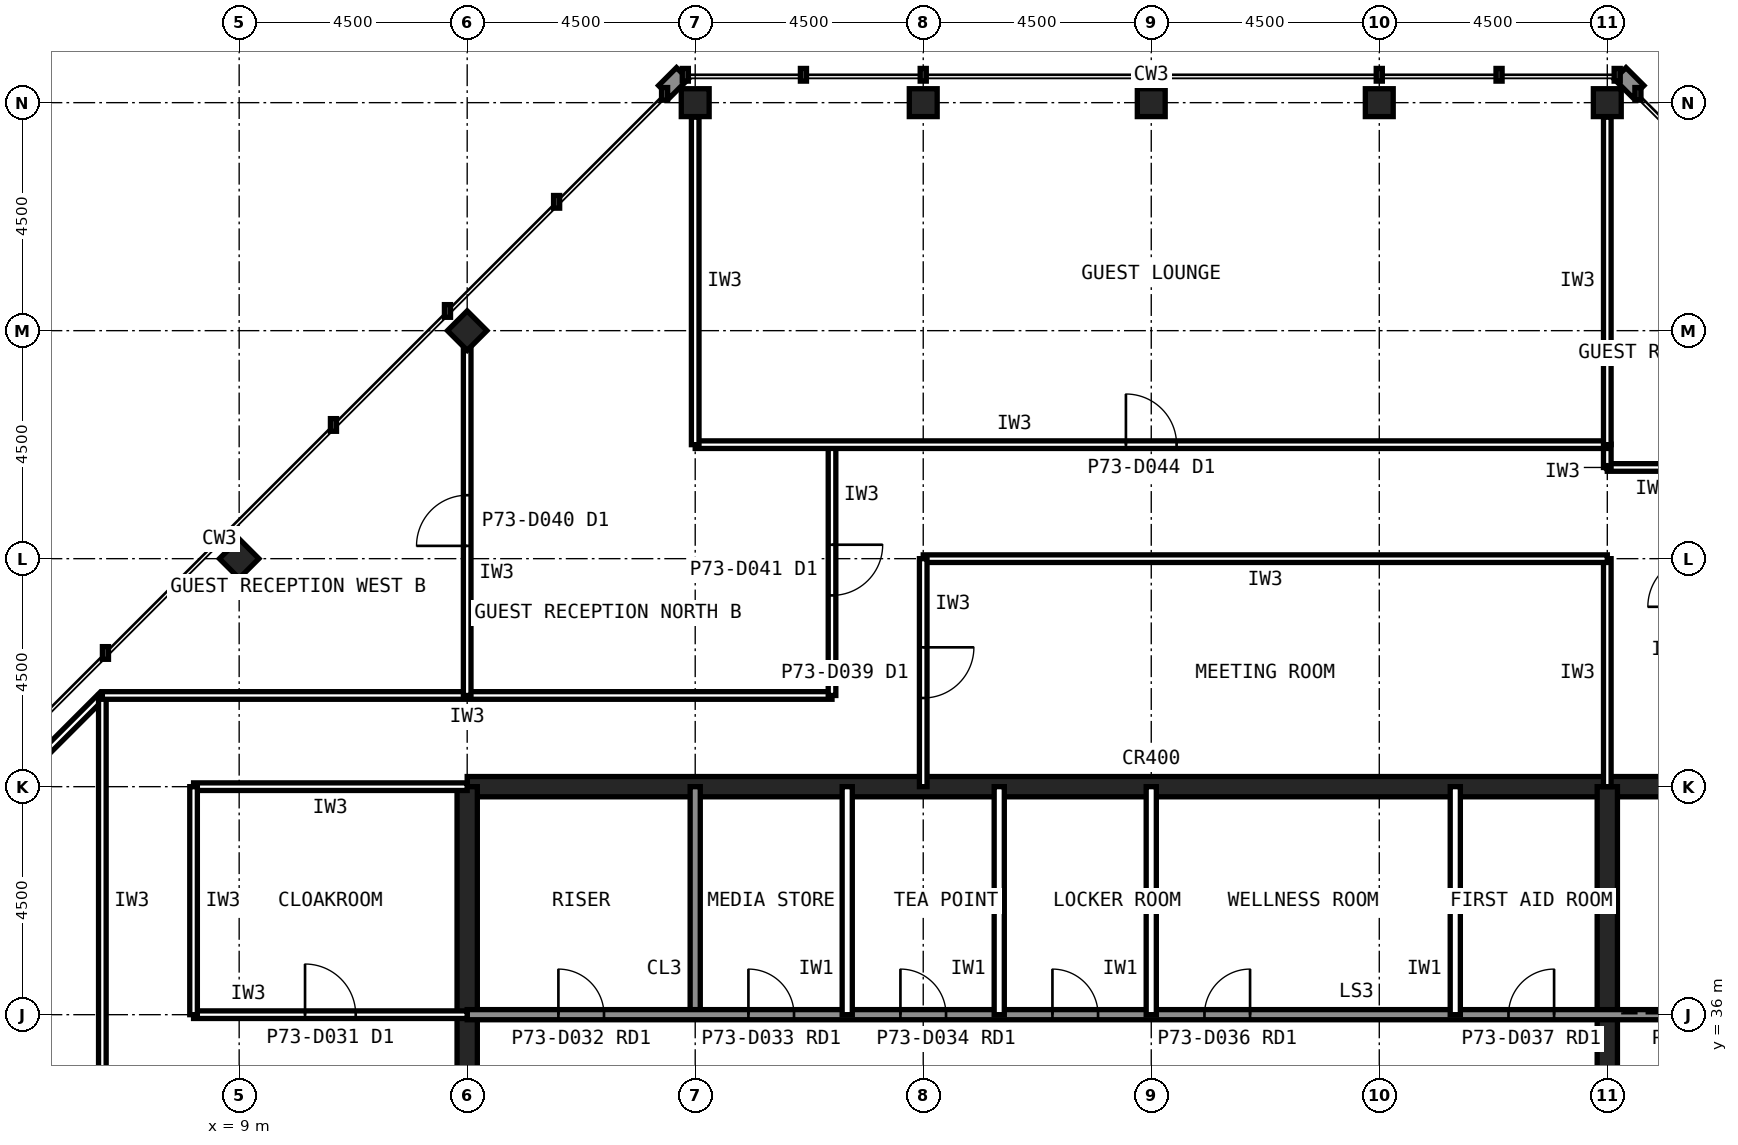
"""IFC4 building model, lengths in metres.
Left out: names, types, materials, properties, quantities, classifications, styles, units other than length and angle.
Written with IfcOpenShell. Run it as: python <this file> out.ifc"""

import sys

from ifc_helpers import new_model, si_unit, direction, frame, frame_2d, origin, origin_2d, place, context, subcontext, project, spatial, rectangle, hollow_rectangle, extrude, element, fill, save


model = new_model("IFC4")
c1 = context("Model", 3, precision=1e-05, world=origin(), true_north=direction((0.0, 1.0)))
c2 = subcontext(c1, "Body", "Model", "MODEL_VIEW")
j1 = project(units=[si_unit("LENGTHUNIT", "METRE"), si_unit("PLANEANGLEUNIT", "RADIAN")], contexts=[c1])
p1 = place(None, origin())
s1 = spatial("IfcSite", under=j1, at=p1, CompositionType="ELEMENT")
p2 = place(p1, origin())
s2 = spatial("IfcBuilding", under=s1, at=p2, CompositionType="ELEMENT")
p3 = place(p2, frame((0.0, 0.0, 302.6)))
s3 = spatial("IfcBuildingStorey", under=s2, at=p3, CompositionType="ELEMENT", Elevation=302.6)
for number, where, z_axis, x_axis in (
    (1, (36.0, 54.0, 0.0), (0.0, 0.0, 1.0), (1.0, 0.0, 0.0)),
    (2, (31.5, 54.0, 0.0), (0.0, 0.0, 1.0), (1.0, 0.0, 0.0)),
    (3, (27.0, 54.0, 0.0), (0.0, 0.0, 1.0), (1.0, 0.0, 0.0)),
    (4, (22.5, 54.0, 0.0), (0.0, 0.0, 1.0), (1.0, 0.0, 0.0)),
    (5, (18.0, 54.0, 0.0), (0.0, 0.0, 1.0), (1.0, 0.0, 0.0)),
    (6, (9.0, 45.0, 0.0), (0.0, 0.0, 1.0), (0.707, 0.707, 0.0)),
    (7, (13.5, 49.5, 0.0), (0.0, 0.0, 1.0), (0.707, 0.707, 0.0)),
):
    element("IfcColumn", number, at=place(p3, frame(where, z_axis=z_axis, x_axis=x_axis)), inside=s3, PredefinedType="COLUMN", context=c2, shape_type="SweptSolid", body=[
        extrude(hollow_rectangle(XDim=0.55, YDim=0.55, WallThickness=0.025, at=origin_2d()), origin(), (0.0, 0.0, 1.0), 4.0),
    ])
p4 = place(p3, frame((40.5, 40.5, 0.0), z_axis=(0.0, 0.0, 1.0), x_axis=(-1.0, 0.0, 0.0)))
e8 = element("IfcWall", 8, at=p4, inside=s3, PredefinedType="SHEAR", context=c2, shape_type="SweptSolid", body=[
    extrude(rectangle(XDim=27.0, YDim=0.4, at=frame_2d((13.5, 0.0))), origin(), (0.0, 0.0, 1.0), 4.0),
])
p5 = place(p3, frame((13.5, 40.5, 0.0), z_axis=(0.0, 0.0, 1.0), x_axis=(0.0, -1.0, 0.0)))
e9 = element("IfcWall", 9, at=p5, inside=s3, PredefinedType="SHEAR", context=c2, shape_type="SweptSolid", body=[
    extrude(rectangle(XDim=27.0, YDim=0.4, at=frame_2d((13.5, 0.0))), origin(), (0.0, 0.0, 1.0), 4.0),
])
p6 = place(p5, frame((19.65, 0.0, 0.0)))
e10 = element("IfcOpeningElement", 10, at=p6, cuts=e9, PredefinedType="OPENING", context=c2, shape_type="SweptSolid", body=[
    extrude(rectangle(XDim=1.2, YDim=2.1, at=frame_2d((0.6, 1.05))), frame((0.0, 0.21, 0.0), z_axis=(0.0, -1.0, 0.0), x_axis=(1.0, 0.0, 0.0)), (0.0, 0.0, 1.0), 0.42),
])
p7 = place(p5, frame((5.85, 0.0, 0.0)))
e11 = element("IfcOpeningElement", 11, at=p7, cuts=e9, PredefinedType="OPENING", context=c2, shape_type="SweptSolid", body=[
    extrude(rectangle(XDim=1.8, YDim=2.1, at=frame_2d((0.9, 1.05))), frame((0.0, 0.21, 0.0), z_axis=(0.0, -1.0, 0.0), x_axis=(1.0, 0.0, 0.0)), (0.0, 0.0, 1.0), 0.42),
])
p8 = place(p3, frame((18.0, 36.0, 0.0), z_axis=(0.0, 0.0, 1.0), x_axis=(0.0, 1.0, 0.0)))
e12 = element("IfcWall", 12, at=p8, inside=s3, PredefinedType="SOLIDWALL", context=c2, shape_type="SweptSolid", body=[
    extrude(rectangle(XDim=4.5, YDim=0.2, at=frame_2d((2.25, 0.0))), origin(), (0.0, 0.0, 1.0), 3.84),
])
p9 = place(p3, frame((36.0, 22.5, 0.0), z_axis=(0.0, 0.0, 1.0), x_axis=(0.0, 1.0, 0.0)))
e13 = element("IfcWall", 13, at=p9, inside=s3, PredefinedType="SHEAR", context=c2, shape_type="SweptSolid", body=[
    extrude(rectangle(XDim=18.0, YDim=0.4, at=frame_2d((9.0, 0.0))), origin(), (0.0, 0.0, 1.0), 4.0),
])
p10 = place(p3, frame((13.5, 36.0, 0.0), z_axis=(0.0, 0.0, 1.0), x_axis=(1.0, 0.0, 0.0)))
e14 = element("IfcWall", 14, at=p10, inside=s3, PredefinedType="SOLIDWALL", context=c2, shape_type="SweptSolid", body=[
    extrude(rectangle(XDim=27.0, YDim=0.2, at=frame_2d((13.5, 0.0))), origin(), (0.0, 0.0, 1.0), 3.84),
])
p11 = place(p10, frame((1.8, 0.0, 0.0)))
e15 = element("IfcOpeningElement", 15, at=p11, cuts=e14, PredefinedType="OPENING", context=c2, shape_type="SweptSolid", body=[
    extrude(rectangle(XDim=0.9, YDim=2.1, at=frame_2d((0.45, 1.05))), frame((0.0, 0.11, 0.0), z_axis=(0.0, -1.0, 0.0), x_axis=(1.0, 0.0, 0.0)), (0.0, 0.0, 1.0), 0.22),
])
p12 = place(p10, frame((5.55, 0.0, 0.0)))
e16 = element("IfcOpeningElement", 16, at=p12, cuts=e14, PredefinedType="OPENING", context=c2, shape_type="SweptSolid", body=[
    extrude(rectangle(XDim=0.9, YDim=2.1, at=frame_2d((0.45, 1.05))), frame((0.0, 0.11, 0.0), z_axis=(0.0, -1.0, 0.0), x_axis=(1.0, 0.0, 0.0)), (0.0, 0.0, 1.0), 0.22),
])
p13 = place(p10, frame((14.55, 0.0, 0.0)))
e17 = element("IfcOpeningElement", 17, at=p13, cuts=e14, PredefinedType="OPENING", context=c2, shape_type="SweptSolid", body=[
    extrude(rectangle(XDim=0.9, YDim=2.1, at=frame_2d((0.45, 1.05))), frame((0.0, 0.11, 0.0), z_axis=(0.0, -1.0, 0.0), x_axis=(1.0, 0.0, 0.0)), (0.0, 0.0, 1.0), 0.22),
])
p14 = place(p10, frame((17.55, 0.0, 0.0)))
e18 = element("IfcOpeningElement", 18, at=p14, cuts=e14, PredefinedType="OPENING", context=c2, shape_type="SweptSolid", body=[
    extrude(rectangle(XDim=0.9, YDim=2.1, at=frame_2d((0.45, 1.05))), frame((0.0, 0.11, 0.0), z_axis=(0.0, -1.0, 0.0), x_axis=(1.0, 0.0, 0.0)), (0.0, 0.0, 1.0), 0.22),
])
p15 = place(p10, frame((20.55, 0.0, 0.0)))
e19 = element("IfcOpeningElement", 19, at=p15, cuts=e14, PredefinedType="OPENING", context=c2, shape_type="SweptSolid", body=[
    extrude(rectangle(XDim=0.9, YDim=2.1, at=frame_2d((0.45, 1.05))), frame((0.0, 0.11, 0.0), z_axis=(0.0, -1.0, 0.0), x_axis=(1.0, 0.0, 0.0)), (0.0, 0.0, 1.0), 0.22),
])
p16 = place(p10, frame((24.1, 0.0, 0.0)))
e20 = element("IfcOpeningElement", 20, at=p16, cuts=e14, PredefinedType="OPENING", context=c2, shape_type="SweptSolid", body=[
    extrude(rectangle(XDim=1.3, YDim=2.2, at=frame_2d((0.65, 1.1))), frame((0.0, 0.11, 0.0), z_axis=(0.0, -1.0, 0.0), x_axis=(1.0, 0.0, 0.0)), (0.0, 0.0, 1.0), 0.22),
])
for number, where, z_axis, x_axis in (
    (21, (27.0, 36.0, 0.0), (0.0, 0.0, 1.0), (0.0, 1.0, 0.0)),
    (22, (30.0, 36.0, 0.0), (0.0, 0.0, 1.0), (0.0, 1.0, 0.0)),
    (23, (33.0, 36.0, 0.0), (0.0, 0.0, 1.0), (0.0, 1.0, 0.0)),
):
    element("IfcWall", number, at=place(p3, frame(where, z_axis=z_axis, x_axis=x_axis)), inside=s3, PredefinedType="PARTITIONING", context=c2, shape_type="SweptSolid", body=[
        extrude(rectangle(XDim=4.5, YDim=0.2, at=frame_2d((2.25, 0.0))), origin(), (0.0, 0.0, 1.0), 3.84),
    ])
p17 = place(p3, frame((0.201, 36.201, 0.0), z_axis=(0.0, 0.0, 1.0), x_axis=(0.707106781187, 0.707106781187, 0.0)))
e24 = element("IfcWall", 24, at=p17, inside=s3, PredefinedType="PARTITIONING", context=c2, shape_type="SweptSolid", body=[
    extrude(rectangle(XDim=8.625, YDim=0.15, at=frame_2d((4.312, 0.0))), origin(), (0.0, 0.0, 1.0), 3.223),
])
p18 = place(p3, frame((6.3, 42.3, 0.0), z_axis=(0.0, 0.0, 1.0), x_axis=(0.0, -1.0, 0.0)))
e25 = element("IfcWall", 25, at=p18, inside=s3, PredefinedType="PARTITIONING", context=c2, shape_type="SweptSolid", body=[
    extrude(rectangle(XDim=8.1, YDim=0.15, at=frame_2d((4.05, 0.0))), origin(), (0.0, 0.0, 1.0), 3.84),
])
p19 = place(p3, frame((37.8, 46.8, 0.0), z_axis=(0.0, 0.0, 1.0), x_axis=(-1.0, 0.0, 0.0)))
e26 = element("IfcWall", 26, at=p19, inside=s3, PredefinedType="PARTITIONING", context=c2, shape_type="SweptSolid", body=[
    extrude(rectangle(XDim=1.8, YDim=0.15, at=frame_2d((0.9, 0.0))), origin(), (0.0, 0.0, 1.0), 3.84),
])
p20 = place(p3, frame((36.0, 46.8, 0.0), z_axis=(0.0, 0.0, 1.0), x_axis=(0.0, 1.0, 0.0)))
e27 = element("IfcWall", 27, at=p20, inside=s3, PredefinedType="PARTITIONING", context=c2, shape_type="SweptSolid", body=[
    extrude(rectangle(XDim=0.46, YDim=0.15, at=frame_2d((0.23, 0.0))), origin(), (0.0, 0.0, 1.0), 2.989),
])
p21 = place(p3, frame((20.7, 42.3, 0.0), z_axis=(0.0, 0.0, 1.0), x_axis=(-1.0, 0.0, 0.0)))
e28 = element("IfcWall", 28, at=p21, inside=s3, PredefinedType="PARTITIONING", context=c2, shape_type="SweptSolid", body=[
    extrude(rectangle(XDim=14.4, YDim=0.15, at=frame_2d((7.2, 0.0))), origin(), (0.0, 0.0, 1.0), 3.84),
])
p22 = place(p3, frame((20.7, 47.25, 0.0), z_axis=(0.0, 0.0, 1.0), x_axis=(0.0, -1.0, 0.0)))
e29 = element("IfcWall", 29, at=p22, inside=s3, PredefinedType="PARTITIONING", context=c2, shape_type="SweptSolid", body=[
    extrude(rectangle(XDim=4.95, YDim=0.15, at=frame_2d((2.475, 0.0))), origin(), (0.0, 0.0, 1.0), 3.84),
])
p23 = place(p22, frame((1.975, 0.0, 0.0)))
e30 = element("IfcOpeningElement", 30, at=p23, cuts=e29, PredefinedType="OPENING", context=c2, shape_type="SweptSolid", body=[
    extrude(rectangle(XDim=1.0, YDim=2.1, at=frame_2d((0.5, 1.05))), frame((0.0, 0.085, 0.0), z_axis=(0.0, -1.0, 0.0), x_axis=(1.0, 0.0, 0.0)), (0.0, 0.0, 1.0), 0.17),
])
p24 = place(p3, frame((18.0, 47.25, 0.0), z_axis=(0.0, 0.0, 1.0), x_axis=(1.0, 0.0, 0.0)))
e31 = element("IfcWall", 31, at=p24, inside=s3, PredefinedType="PARTITIONING", context=c2, shape_type="SweptSolid", body=[
    extrude(rectangle(XDim=18.0, YDim=0.15, at=frame_2d((9.0, 0.0))), origin(), (0.0, 0.0, 1.0), 3.84),
])
p25 = place(p24, frame((8.5, 0.0, 0.0)))
e32 = element("IfcOpeningElement", 32, at=p25, cuts=e31, PredefinedType="OPENING", context=c2, shape_type="SweptSolid", body=[
    extrude(rectangle(XDim=1.0, YDim=2.1, at=frame_2d((0.5, 1.05))), frame((0.0, 0.085, 0.0), z_axis=(0.0, -1.0, 0.0), x_axis=(1.0, 0.0, 0.0)), (0.0, 0.0, 1.0), 0.17),
])
for number, where, z_axis, x_axis in (
    (33, (36.0, 47.25, 0.0), (0.0, 0.0, 1.0), (0.0, 1.0, 0.0)),
    (34, (18.0, 53.715, 0.0), (0.0, 0.0, 1.0), (0.0, -1.0, 0.0)),
):
    element("IfcWall", number, at=place(p3, frame(where, z_axis=z_axis, x_axis=x_axis)), inside=s3, PredefinedType="PARTITIONING", context=c2, shape_type="SweptSolid", body=[
        extrude(rectangle(XDim=6.465, YDim=0.15, at=frame_2d((3.232, 0.0))), origin(), (0.0, 0.0, 1.0), 2.989),
    ])
p26 = place(p3, frame((36.0, 40.5, 0.0), z_axis=(0.0, 0.0, 1.0), x_axis=(0.0, 1.0, 0.0)))
e35 = element("IfcWall", 35, at=p26, inside=s3, PredefinedType="PARTITIONING", context=c2, shape_type="SweptSolid", body=[
    extrude(rectangle(XDim=4.5, YDim=0.15, at=frame_2d((2.25, 0.0))), origin(), (0.0, 0.0, 1.0), 2.989),
])
p27 = place(p3, frame((36.0, 45.0, 0.0), z_axis=(0.0, 0.0, 1.0), x_axis=(-1.0, 0.0, 0.0)))
e36 = element("IfcWall", 36, at=p27, inside=s3, PredefinedType="PARTITIONING", context=c2, shape_type="SweptSolid", body=[
    extrude(rectangle(XDim=13.5, YDim=0.15, at=frame_2d((6.75, 0.0))), origin(), (0.0, 0.0, 1.0), 3.84),
])
p28 = place(p3, frame((22.5, 45.0, 0.0), z_axis=(0.0, 0.0, 1.0), x_axis=(0.0, -1.0, 0.0)))
e37 = element("IfcWall", 37, at=p28, inside=s3, PredefinedType="PARTITIONING", context=c2, shape_type="SweptSolid", body=[
    extrude(rectangle(XDim=4.5, YDim=0.15, at=frame_2d((2.25, 0.0))), origin(), (0.0, 0.0, 1.0), 2.989),
])
p29 = place(p28, frame((1.75, 0.0, 0.0)))
e38 = element("IfcOpeningElement", 38, at=p29, cuts=e37, PredefinedType="OPENING", context=c2, shape_type="SweptSolid", body=[
    extrude(rectangle(XDim=1.0, YDim=2.1, at=frame_2d((0.5, 1.05))), frame((0.0, 0.085, 0.0), z_axis=(0.0, -1.0, 0.0), x_axis=(1.0, 0.0, 0.0)), (0.0, 0.0, 1.0), 0.17),
])
p30 = place(p3, frame((8.1, 36.0, 0.0), z_axis=(0.0, 0.0, 1.0), x_axis=(1.0, 0.0, 0.0)))
e39 = element("IfcWall", 39, at=p30, inside=s3, PredefinedType="PARTITIONING", context=c2, shape_type="SweptSolid", body=[
    extrude(rectangle(XDim=5.4, YDim=0.15, at=frame_2d((2.7, 0.0))), origin(), (0.0, 0.0, 1.0), 2.989),
])
p31 = place(p30, frame((2.2, 0.0, 0.0)))
e40 = element("IfcOpeningElement", 40, at=p31, cuts=e39, PredefinedType="OPENING", context=c2, shape_type="SweptSolid", body=[
    extrude(rectangle(XDim=1.0, YDim=2.1, at=frame_2d((0.5, 1.05))), frame((0.0, 0.085, 0.0), z_axis=(0.0, -1.0, 0.0), x_axis=(1.0, 0.0, 0.0)), (0.0, 0.0, 1.0), 0.17),
])
p32 = place(p3, frame((13.5, 40.5, 0.0), z_axis=(0.0, 0.0, 1.0), x_axis=(-1.0, 0.0, 0.0)))
e41 = element("IfcWall", 41, at=p32, inside=s3, PredefinedType="PARTITIONING", context=c2, shape_type="SweptSolid", body=[
    extrude(rectangle(XDim=5.4, YDim=0.15, at=frame_2d((2.7, 0.0))), origin(), (0.0, 0.0, 1.0), 2.989),
])
p33 = place(p3, frame((8.1, 40.5, 0.0), z_axis=(0.0, 0.0, 1.0), x_axis=(0.0, -1.0, 0.0)))
e42 = element("IfcWall", 42, at=p33, inside=s3, PredefinedType="PARTITIONING", context=c2, shape_type="SweptSolid", body=[
    extrude(rectangle(XDim=4.5, YDim=0.15, at=frame_2d((2.25, 0.0))), origin(), (0.0, 0.0, 1.0), 3.84),
])
p34 = place(p3, frame((13.5, 42.3, 0.0), z_axis=(0.0, 0.0, 1.0), x_axis=(0.0, 1.0, 0.0)))
e43 = element("IfcWall", 43, at=p34, inside=s3, PredefinedType="PARTITIONING", context=c2, shape_type="SweptSolid", body=[
    extrude(rectangle(XDim=6.905, YDim=0.15, at=frame_2d((3.453, 0.0))), origin(), (0.0, 0.0, 1.0), 2.989),
])
p35 = place(p34, frame((2.952, 0.0, 0.0)))
e44 = element("IfcOpeningElement", 44, at=p35, cuts=e43, PredefinedType="OPENING", context=c2, shape_type="SweptSolid", body=[
    extrude(rectangle(XDim=1.0, YDim=2.1, at=frame_2d((0.5, 1.05))), frame((0.0, 0.085, 0.0), z_axis=(0.0, -1.0, 0.0), x_axis=(1.0, 0.0, 0.0)), (0.0, 0.0, 1.0), 0.17),
])
p36 = place(p11, origin())
e45 = element("IfcDoor", 45, at=p36, inside=s3, OperationType="SINGLE_SWING_LEFT", PredefinedType="DOOR", context=c2, shape_type="SweptSolid", body=[
    extrude(rectangle(XDim=0.9, YDim=2.1, at=frame_2d((0.45, 1.05))), frame((0.0, 0.025, 0.0), z_axis=(0.0, -1.0, 0.0), x_axis=(1.0, 0.0, 0.0)), (0.0, 0.0, 1.0), 0.05),
])
fill(e15, e45)
p37 = place(p12, origin())
e46 = element("IfcDoor", 46, at=p37, inside=s3, OperationType="SINGLE_SWING_LEFT", PredefinedType="DOOR", context=c2, shape_type="SweptSolid", body=[
    extrude(rectangle(XDim=0.9, YDim=2.1, at=frame_2d((0.45, 1.05))), frame((0.0, 0.025, 0.0), z_axis=(0.0, -1.0, 0.0), x_axis=(1.0, 0.0, 0.0)), (0.0, 0.0, 1.0), 0.05),
])
fill(e16, e46)
p38 = place(p13, origin())
e47 = element("IfcDoor", 47, at=p38, inside=s3, OperationType="SINGLE_SWING_RIGHT", PredefinedType="DOOR", context=c2, shape_type="SweptSolid", body=[
    extrude(rectangle(XDim=0.9, YDim=2.1, at=frame_2d((0.45, 1.05))), frame((0.0, 0.025, 0.0), z_axis=(0.0, -1.0, 0.0), x_axis=(1.0, 0.0, 0.0)), (0.0, 0.0, 1.0), 0.05),
])
fill(e17, e47)
p39 = place(p14, origin())
e48 = element("IfcDoor", 48, at=p39, inside=s3, OperationType="SINGLE_SWING_RIGHT", PredefinedType="DOOR", context=c2, shape_type="SweptSolid", body=[
    extrude(rectangle(XDim=0.9, YDim=2.1, at=frame_2d((0.45, 1.05))), frame((0.0, 0.025, 0.0), z_axis=(0.0, -1.0, 0.0), x_axis=(1.0, 0.0, 0.0)), (0.0, 0.0, 1.0), 0.05),
])
fill(e18, e48)
p40 = place(p15, origin())
e49 = element("IfcDoor", 49, at=p40, inside=s3, OperationType="SINGLE_SWING_RIGHT", PredefinedType="DOOR", context=c2, shape_type="SweptSolid", body=[
    extrude(rectangle(XDim=0.9, YDim=2.1, at=frame_2d((0.45, 1.05))), frame((0.0, 0.025, 0.0), z_axis=(0.0, -1.0, 0.0), x_axis=(1.0, 0.0, 0.0)), (0.0, 0.0, 1.0), 0.05),
])
fill(e19, e49)
p41 = place(p23, origin())
e50 = element("IfcDoor", 50, at=p41, inside=s3, OperationType="SINGLE_SWING_LEFT", PredefinedType="DOOR", context=c2, shape_type="SweptSolid", body=[
    extrude(rectangle(XDim=1.0, YDim=2.1, at=frame_2d((0.5, 1.05))), frame((0.0, 0.025, 0.0), z_axis=(0.0, -1.0, 0.0), x_axis=(1.0, 0.0, 0.0)), (0.0, 0.0, 1.0), 0.05),
])
fill(e30, e50)
p42 = place(p25, origin())
e51 = element("IfcDoor", 51, at=p42, inside=s3, OperationType="SINGLE_SWING_LEFT", PredefinedType="DOOR", context=c2, shape_type="SweptSolid", body=[
    extrude(rectangle(XDim=1.0, YDim=2.1, at=frame_2d((0.5, 1.05))), frame((0.0, 0.025, 0.0), z_axis=(0.0, -1.0, 0.0), x_axis=(1.0, 0.0, 0.0)), (0.0, 0.0, 1.0), 0.05),
])
fill(e32, e51)
p43 = place(p29, origin())
e52 = element("IfcDoor", 52, at=p43, inside=s3, OperationType="SINGLE_SWING_LEFT", PredefinedType="DOOR", context=c2, shape_type="SweptSolid", body=[
    extrude(rectangle(XDim=1.0, YDim=2.1, at=frame_2d((0.5, 1.05))), frame((0.0, 0.025, 0.0), z_axis=(0.0, -1.0, 0.0), x_axis=(1.0, 0.0, 0.0)), (0.0, 0.0, 1.0), 0.05),
])
fill(e38, e52)
p44 = place(p31, origin())
e53 = element("IfcDoor", 53, at=p44, inside=s3, OperationType="SINGLE_SWING_LEFT", PredefinedType="DOOR", context=c2, shape_type="SweptSolid", body=[
    extrude(rectangle(XDim=1.0, YDim=2.1, at=frame_2d((0.5, 1.05))), frame((0.0, 0.025, 0.0), z_axis=(0.0, -1.0, 0.0), x_axis=(1.0, 0.0, 0.0)), (0.0, 0.0, 1.0), 0.05),
])
fill(e40, e53)
p45 = place(p35, origin())
e54 = element("IfcDoor", 54, at=p45, inside=s3, OperationType="SINGLE_SWING_LEFT", PredefinedType="DOOR", context=c2, shape_type="SweptSolid", body=[
    extrude(rectangle(XDim=1.0, YDim=2.1, at=frame_2d((0.5, 1.05))), frame((0.0, 0.025, 0.0), z_axis=(0.0, -1.0, 0.0), x_axis=(1.0, 0.0, 0.0)), (0.0, 0.0, 1.0), 0.05),
])
fill(e44, e54)
save(model, sys.argv[1])
